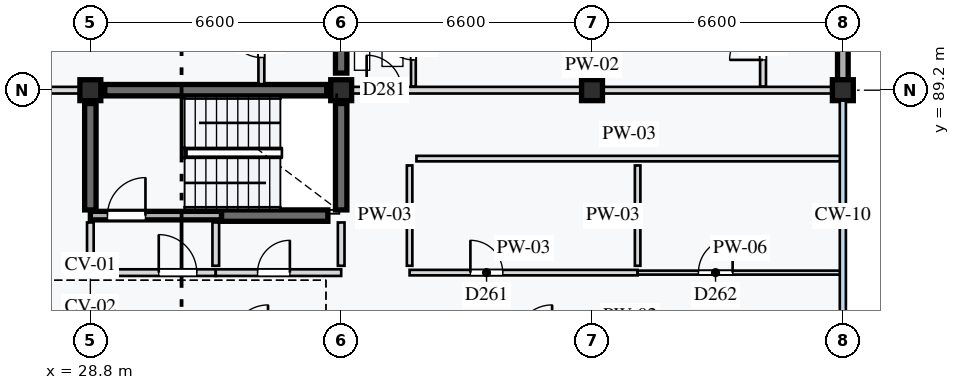
"""IFC4 building model, lengths in metres.
Left out: names, types, materials, properties, quantities, classifications, styles, units other than length and angle.
Written with IfcOpenShell. Run it as: python <this file> out.ifc"""

import sys

from ifc_helpers import new_model, si_unit, direction, frame, frame_2d, origin, origin_2d, place, context, subcontext, project, spatial, rectangle, extrude, element, fill, save


model = new_model("IFC4")
c1 = context("Model", 3, precision=1e-05, world=origin(), true_north=direction((0.0, 1.0)))
c2 = subcontext(c1, "Body", "Model", "MODEL_VIEW")
j1 = project(units=[si_unit("LENGTHUNIT", "METRE"), si_unit("PLANEANGLEUNIT", "RADIAN")], contexts=[c1])
p1 = place(None, origin())
s1 = spatial("IfcSite", under=j1, at=p1, CompositionType="ELEMENT")
p2 = place(p1, origin())
s2 = spatial("IfcBuilding", under=s1, at=p2, CompositionType="ELEMENT")
p3 = place(p2, frame((0.0, 0.0, 27.6)))
s3 = spatial("IfcBuildingStorey", under=s2, at=p3, CompositionType="ELEMENT", Elevation=27.6)
for number, where, z_axis, x_axis in (
    (1, (28.8, 89.2, 0.0), (0.0, 0.0, 1.0), (1.0, 0.0, 0.0)),
    (2, (35.4, 89.2, 0.0), (0.0, 0.0, 1.0), (1.0, 0.0, 0.0)),
    (3, (42.0, 89.2, 0.0), (0.0, 0.0, 1.0), (1.0, 0.0, 0.0)),
    (4, (48.6, 89.2, 0.0), (0.0, 0.0, 1.0), (1.0, 0.0, 0.0)),
):
    element("IfcColumn", number, at=place(p3, frame(where, z_axis=z_axis, x_axis=x_axis)), inside=s3, PredefinedType="COLUMN", context=c2, shape_type="SweptSolid", body=[
        extrude(rectangle(XDim=0.55, YDim=0.55, at=origin_2d()), origin(), (0.0, 0.0, 1.0), 3.2),
    ])
p4 = place(p3, frame((29.18, 89.2, 0.0), z_axis=(0.0, 0.0, 1.0), x_axis=(1.0, 0.0, 0.0)))
e5 = element("IfcWall", 5, at=p4, inside=s3, PredefinedType="SHEAR", context=c2, shape_type="SweptSolid", body=[
    extrude(rectangle(XDim=5.84, YDim=0.3, at=frame_2d((2.92, 0.0))), origin(), (0.0, 0.0, 1.0), 2.97),
])
for number, where, z_axis, x_axis in (
    (6, (32.25, 85.9, 0.0), (0.0, 0.0, 1.0), (1.0, 0.0, 0.0)),
    (7, (28.8, 86.05, 0.0), (0.0, 0.0, 1.0), (0.0, 1.0, 0.0)),
    (8, (35.4, 86.05, 0.0), (0.0, 0.0, 1.0), (0.0, 1.0, 0.0)),
):
    element("IfcWall", number, at=place(p3, frame(where, z_axis=z_axis, x_axis=x_axis)), inside=s3, PredefinedType="SHEAR", context=c2, shape_type="SweptSolid", body=[
        extrude(rectangle(XDim=2.8, YDim=0.3, at=frame_2d((1.4, 0.0))), origin(), (0.0, 0.0, 1.0), 2.97),
    ])
p5 = place(p3, frame((35.4, 89.65, 0.0), z_axis=(0.0, 0.0, 1.0), x_axis=(0.0, 1.0, 0.0)))
e9 = element("IfcWall", 9, at=p5, inside=s3, PredefinedType="SHEAR", context=c2, shape_type="SweptSolid", body=[
    extrude(rectangle(XDim=5.7, YDim=0.3, at=frame_2d((2.85, 0.0))), origin(), (0.0, 0.0, 1.0), 2.97),
])
p6 = place(p3, frame((48.6, 89.475, 0.0), z_axis=(0.0, 0.0, 1.0), x_axis=(0.0, 1.0, 0.0)))
e10 = element("IfcWall", 10, at=p6, inside=s3, PredefinedType="STANDARD", context=c2, shape_type="SweptSolid", body=[
    extrude(rectangle(XDim=3.985, YDim=0.28, at=frame_2d((1.992, 0.0))), origin(), (0.0, 0.0, 1.0), 2.65),
])
p7 = place(p3, frame((28.8, 85.9, 0.0), z_axis=(0.0, 0.0, 1.0), x_axis=(1.0, 0.0, 0.0)))
e11 = element("IfcWall", 11, at=p7, inside=s3, PredefinedType="STANDARD", context=c2, shape_type="SweptSolid", body=[
    extrude(rectangle(XDim=3.45, YDim=0.225, at=frame_2d((1.725, 0.0))), origin(), (0.0, 0.0, 1.0), 2.97),
])
p8 = place(p7, frame((0.45, 0.0, 0.0)))
e12 = element("IfcOpeningElement", 12, at=p8, cuts=e11, PredefinedType="OPENING", context=c2, shape_type="SweptSolid", body=[
    extrude(rectangle(XDim=1.0, YDim=2.1, at=frame_2d((0.5, 1.05))), frame((0.0, 0.123, 0.0), z_axis=(0.0, -1.0, 0.0), x_axis=(1.0, 0.0, 0.0)), (0.0, 0.0, 1.0), 0.245),
])
p9 = place(p3, frame((28.8, 84.4, 0.0), z_axis=(0.0, 0.0, 1.0), x_axis=(1.0, 0.0, 0.0)))
e13 = element("IfcWall", 13, at=p9, inside=s3, PredefinedType="PARTITIONING", context=c2, shape_type="SweptSolid", body=[
    extrude(rectangle(XDim=3.3, YDim=0.175, at=frame_2d((1.65, 0.0))), origin(), (0.0, 0.0, 1.0), 2.97),
])
p10 = place(p9, frame((1.8, 0.0, 0.0)))
e14 = element("IfcOpeningElement", 14, at=p10, cuts=e13, PredefinedType="OPENING", context=c2, shape_type="SweptSolid", body=[
    extrude(rectangle(XDim=1.0, YDim=2.16, at=frame_2d((0.5, 1.08))), frame((0.0, 0.097, 0.0), z_axis=(0.0, -1.0, 0.0), x_axis=(1.0, 0.0, 0.0)), (0.0, 0.0, 1.0), 0.195),
])
p11 = place(p3, frame((32.1, 84.4, 0.0), z_axis=(0.0, 0.0, 1.0), x_axis=(1.0, 0.0, 0.0)))
e15 = element("IfcWall", 15, at=p11, inside=s3, PredefinedType="PARTITIONING", context=c2, shape_type="SweptSolid", body=[
    extrude(rectangle(XDim=3.3, YDim=0.175, at=frame_2d((1.65, 0.0))), origin(), (0.0, 0.0, 1.0), 2.97),
])
p12 = place(p11, frame((1.1, 0.0, 0.0)))
e16 = element("IfcOpeningElement", 16, at=p12, cuts=e15, PredefinedType="OPENING", context=c2, shape_type="SweptSolid", body=[
    extrude(rectangle(XDim=0.85, YDim=2.0, at=frame_2d((0.425, 1.0))), frame((0.0, 0.097, 0.0), z_axis=(0.0, -1.0, 0.0), x_axis=(1.0, 0.0, 0.0)), (0.0, 0.0, 1.0), 0.195),
])
for number, where, z_axis, x_axis in (
    (17, (28.8, 84.58, 0.0), (0.0, 0.0, 1.0), (0.0, 1.0, 0.0)),
    (18, (32.1, 84.58, 0.0), (0.0, 0.0, 1.0), (0.0, 1.0, 0.0)),
    (19, (35.4, 84.58, 0.0), (0.0, 0.0, 1.0), (0.0, 1.0, 0.0)),
):
    element("IfcWall", number, at=place(p3, frame(where, z_axis=z_axis, x_axis=x_axis)), inside=s3, PredefinedType="PARTITIONING", context=c2, shape_type="SweptSolid", body=[
        extrude(rectangle(XDim=1.14, YDim=0.175, at=frame_2d((0.57, 0.0))), origin(), (0.0, 0.0, 1.0), 2.97),
    ])
p13 = place(p3, frame((37.2, 84.4, 0.0), z_axis=(0.0, 0.0, 1.0), x_axis=(1.0, 0.0, 0.0)))
e20 = element("IfcWall", 20, at=p13, inside=s3, PredefinedType="PARTITIONING", context=c2, shape_type="SweptSolid", body=[
    extrude(rectangle(XDim=6.0, YDim=0.145, at=frame_2d((3.0, 0.0))), origin(), (0.0, 0.0, 1.0), 2.97),
])
p14 = place(p13, frame((1.6, 0.0, 0.0)))
e21 = element("IfcOpeningElement", 21, at=p14, cuts=e20, PredefinedType="OPENING", context=c2, shape_type="SweptSolid", body=[
    extrude(rectangle(XDim=0.85, YDim=2.1, at=frame_2d((0.425, 1.05))), frame((0.0, 0.083, 0.0), z_axis=(0.0, -1.0, 0.0), x_axis=(1.0, 0.0, 0.0)), (0.0, 0.0, 1.0), 0.165),
])
p15 = place(p3, frame((43.2, 84.4, 0.0), z_axis=(0.0, 0.0, 1.0), x_axis=(1.0, 0.0, 0.0)))
e22 = element("IfcWall", 22, at=p15, inside=s3, PredefinedType="PARTITIONING", context=c2, shape_type="SweptSolid", body=[
    extrude(rectangle(XDim=5.4, YDim=0.105, at=frame_2d((2.7, 0.0))), origin(), (0.0, 0.0, 1.0), 2.97),
])
p16 = place(p15, frame((1.6, 0.0, 0.0)))
e23 = element("IfcOpeningElement", 23, at=p16, cuts=e22, PredefinedType="OPENING", context=c2, shape_type="SweptSolid", body=[
    extrude(rectangle(XDim=0.9, YDim=2.1, at=frame_2d((0.45, 1.05))), frame((0.0, 0.062, 0.0), z_axis=(0.0, -1.0, 0.0), x_axis=(1.0, 0.0, 0.0)), (0.0, 0.0, 1.0), 0.125),
])
p17 = place(p3, frame((43.2, 84.58, 0.0), z_axis=(0.0, 0.0, 1.0), x_axis=(0.0, 1.0, 0.0)))
e24 = element("IfcWall", 24, at=p17, inside=s3, PredefinedType="PARTITIONING", context=c2, shape_type="SweptSolid", body=[
    extrude(rectangle(XDim=2.64, YDim=0.145, at=frame_2d((1.32, 0.0))), origin(), (0.0, 0.0, 1.0), 2.97),
])
p18 = place(p3, frame((37.38, 87.4, 0.0), z_axis=(0.0, 0.0, 1.0), x_axis=(1.0, 0.0, 0.0)))
e25 = element("IfcWall", 25, at=p18, inside=s3, PredefinedType="PARTITIONING", context=c2, shape_type="SweptSolid", body=[
    extrude(rectangle(XDim=11.2, YDim=0.145, at=frame_2d((5.6, 0.0))), origin(), (0.0, 0.0, 1.0), 2.97),
])
p19 = place(p3, frame((37.2, 84.58, 0.0), z_axis=(0.0, 0.0, 1.0), x_axis=(0.0, 1.0, 0.0)))
e26 = element("IfcWall", 26, at=p19, inside=s3, PredefinedType="PARTITIONING", context=c2, shape_type="SweptSolid", body=[
    extrude(rectangle(XDim=2.64, YDim=0.145, at=frame_2d((1.32, 0.0))), origin(), (0.0, 0.0, 1.0), 2.97),
])
p20 = place(p3, frame((22.2, 89.2, 0.0), z_axis=(0.0, 0.0, 1.0), x_axis=(1.0, 0.0, 0.0)))
e27 = element("IfcWall", 27, at=p20, inside=s3, PredefinedType="PARTITIONING", context=c2, shape_type="SweptSolid", body=[
    extrude(rectangle(XDim=6.6, YDim=0.175, at=frame_2d((3.3, 0.0))), origin(), (0.0, 0.0, 1.0), 2.55),
])
p21 = place(p20, frame((3.85, 0.0, 0.0)))
e28 = element("IfcOpeningElement", 28, at=p21, cuts=e27, PredefinedType="OPENING", context=c2, shape_type="SweptSolid", body=[
    extrude(rectangle(XDim=0.95, YDim=2.16, at=frame_2d((0.475, 1.08))), frame((0.0, 0.097, 0.0), z_axis=(0.0, -1.0, 0.0), x_axis=(1.0, 0.0, 0.0)), (0.0, 0.0, 1.0), 0.195),
])
p22 = place(p3, frame((33.3, 89.36, 0.0), z_axis=(0.0, 0.0, 1.0), x_axis=(0.0, 1.0, 0.0)))
e29 = element("IfcWall", 29, at=p22, inside=s3, PredefinedType="PARTITIONING", context=c2, shape_type="SweptSolid", body=[
    extrude(rectangle(XDim=2.24, YDim=0.155, at=frame_2d((1.12, 0.0))), origin(), (0.0, 0.0, 1.0), 2.97),
])
p23 = place(p22, frame((0.7, 0.0, 0.0)))
e30 = element("IfcOpeningElement", 30, at=p23, cuts=e29, PredefinedType="OPENING", context=c2, shape_type="SweptSolid", body=[
    extrude(rectangle(XDim=0.87, YDim=2.08, at=frame_2d((0.435, 1.04))), frame((0.0, 0.087, 0.0), z_axis=(0.0, -1.0, 0.0), x_axis=(1.0, 0.0, 0.0)), (0.0, 0.0, 1.0), 0.175),
])
p24 = place(p3, frame((35.4, 89.2, 0.0), z_axis=(0.0, 0.0, 1.0), x_axis=(1.0, 0.0, 0.0)))
e31 = element("IfcWall", 31, at=p24, inside=s3, PredefinedType="PARTITIONING", context=c2, shape_type="SweptSolid", body=[
    extrude(rectangle(XDim=13.2, YDim=0.175, at=frame_2d((6.6, 0.0))), origin(), (0.0, 0.0, 1.0), 2.55),
])
p25 = place(p24, frame((0.67, 0.0, 0.0)))
e32 = element("IfcOpeningElement", 32, at=p25, cuts=e31, PredefinedType="OPENING", context=c2, shape_type="SweptSolid", body=[
    extrude(rectangle(XDim=0.92, YDim=2.14, at=frame_2d((0.46, 1.07))), frame((0.0, 0.097, 0.0), z_axis=(0.0, -1.0, 0.0), x_axis=(1.0, 0.0, 0.0)), (0.0, 0.0, 1.0), 0.195),
])
p26 = place(p3, frame((37.3, 89.298, 0.0), z_axis=(0.0, 0.0, 1.0), x_axis=(0.0, 1.0, 0.0)))
e33 = element("IfcWall", 33, at=p26, inside=s3, PredefinedType="PARTITIONING", context=c2, shape_type="SweptSolid", body=[
    extrude(rectangle(XDim=2.302, YDim=0.125, at=frame_2d((1.151, 0.0))), origin(), (0.0, 0.0, 1.0), 2.97),
])
p27 = place(p26, frame((0.7, 0.0, 0.0)))
e34 = element("IfcOpeningElement", 34, at=p27, cuts=e33, PredefinedType="OPENING", context=c2, shape_type="SweptSolid", body=[
    extrude(rectangle(XDim=0.82, YDim=2.05, at=frame_2d((0.41, 1.025))), frame((0.0, 0.073, 0.0), z_axis=(0.0, -1.0, 0.0), x_axis=(1.0, 0.0, 0.0)), (0.0, 0.0, 1.0), 0.145),
])
p28 = place(p3, frame((46.5, 89.298, 0.0), z_axis=(0.0, 0.0, 1.0), x_axis=(0.0, 1.0, 0.0)))
e35 = element("IfcWall", 35, at=p28, inside=s3, PredefinedType="PARTITIONING", context=c2, shape_type="SweptSolid", body=[
    extrude(rectangle(XDim=2.302, YDim=0.155, at=frame_2d((1.151, 0.0))), origin(), (0.0, 0.0, 1.0), 2.97),
])
p29 = place(p28, frame((0.7, 0.0, 0.0)))
e36 = element("IfcOpeningElement", 36, at=p29, cuts=e35, PredefinedType="OPENING", context=c2, shape_type="SweptSolid", body=[
    extrude(rectangle(XDim=0.88, YDim=2.1, at=frame_2d((0.44, 1.05))), frame((0.0, 0.087, 0.0), z_axis=(0.0, -1.0, 0.0), x_axis=(1.0, 0.0, 0.0)), (0.0, 0.0, 1.0), 0.175),
])
p30 = place(p8, origin())
e37 = element("IfcDoor", 37, at=p30, inside=s3, OperationType="SINGLE_SWING_RIGHT", PredefinedType="DOOR", context=c2, shape_type="SweptSolid", body=[
    extrude(rectangle(XDim=1.0, YDim=2.1, at=frame_2d((0.5, 1.05))), frame((0.0, 0.025, 0.0), z_axis=(0.0, -1.0, 0.0), x_axis=(1.0, 0.0, 0.0)), (0.0, 0.0, 1.0), 0.05),
])
fill(e12, e37)
p31 = place(p10, origin())
e38 = element("IfcDoor", 38, at=p31, inside=s3, OperationType="SINGLE_SWING_LEFT", PredefinedType="DOOR", context=c2, shape_type="SweptSolid", body=[
    extrude(rectangle(XDim=1.0, YDim=2.16, at=frame_2d((0.5, 1.08))), frame((0.0, 0.025, 0.0), z_axis=(0.0, -1.0, 0.0), x_axis=(1.0, 0.0, 0.0)), (0.0, 0.0, 1.0), 0.05),
])
fill(e14, e38)
p32 = place(p12, origin())
e39 = element("IfcDoor", 39, at=p32, inside=s3, OperationType="SINGLE_SWING_RIGHT", PredefinedType="DOOR", context=c2, shape_type="SweptSolid", body=[
    extrude(rectangle(XDim=0.85, YDim=2.0, at=frame_2d((0.425, 1.0))), frame((0.0, 0.025, 0.0), z_axis=(0.0, -1.0, 0.0), x_axis=(1.0, 0.0, 0.0)), (0.0, 0.0, 1.0), 0.05),
])
fill(e16, e39)
p33 = place(p14, origin())
e40 = element("IfcDoor", 40, at=p33, inside=s3, OperationType="SINGLE_SWING_LEFT", PredefinedType="DOOR", context=c2, shape_type="SweptSolid", body=[
    extrude(rectangle(XDim=0.85, YDim=2.1, at=frame_2d((0.425, 1.05))), frame((0.0, 0.025, 0.0), z_axis=(0.0, -1.0, 0.0), x_axis=(1.0, 0.0, 0.0)), (0.0, 0.0, 1.0), 0.05),
])
fill(e21, e40)
p34 = place(p16, origin())
e41 = element("IfcDoor", 41, at=p34, inside=s3, OperationType="SINGLE_SWING_RIGHT", PredefinedType="DOOR", context=c2, shape_type="SweptSolid", body=[
    extrude(rectangle(XDim=0.9, YDim=2.1, at=frame_2d((0.45, 1.05))), frame((0.0, 0.025, 0.0), z_axis=(0.0, -1.0, 0.0), x_axis=(1.0, 0.0, 0.0)), (0.0, 0.0, 1.0), 0.05),
])
fill(e23, e41)
p35 = place(p23, origin())
e42 = element("IfcDoor", 42, at=p35, inside=s3, OperationType="SINGLE_SWING_RIGHT", PredefinedType="DOOR", context=c2, shape_type="SweptSolid", body=[
    extrude(rectangle(XDim=0.87, YDim=2.08, at=frame_2d((0.435, 1.04))), frame((0.0, 0.025, 0.0), z_axis=(0.0, -1.0, 0.0), x_axis=(1.0, 0.0, 0.0)), (0.0, 0.0, 1.0), 0.05),
])
fill(e30, e42)
p36 = place(p25, origin())
e43 = element("IfcDoor", 43, at=p36, inside=s3, OperationType="SINGLE_SWING_LEFT", PredefinedType="DOOR", context=c2, shape_type="SweptSolid", body=[
    extrude(rectangle(XDim=0.92, YDim=2.14, at=frame_2d((0.46, 1.07))), frame((0.0, 0.025, 0.0), z_axis=(0.0, -1.0, 0.0), x_axis=(1.0, 0.0, 0.0)), (0.0, 0.0, 1.0), 0.05),
])
fill(e32, e43)
p37 = place(p27, origin())
e44 = element("IfcDoor", 44, at=p37, inside=s3, OperationType="SINGLE_SWING_RIGHT", PredefinedType="DOOR", context=c2, shape_type="SweptSolid", body=[
    extrude(rectangle(XDim=0.82, YDim=2.05, at=frame_2d((0.41, 1.025))), frame((0.0, 0.025, 0.0), z_axis=(0.0, -1.0, 0.0), x_axis=(1.0, 0.0, 0.0)), (0.0, 0.0, 1.0), 0.05),
])
fill(e34, e44)
p38 = place(p29, origin())
e45 = element("IfcDoor", 45, at=p38, inside=s3, OperationType="SINGLE_SWING_LEFT", PredefinedType="DOOR", context=c2, shape_type="SweptSolid", body=[
    extrude(rectangle(XDim=0.88, YDim=2.1, at=frame_2d((0.44, 1.05))), frame((0.0, 0.025, 0.0), z_axis=(0.0, -1.0, 0.0), x_axis=(1.0, 0.0, 0.0)), (0.0, 0.0, 1.0), 0.05),
])
fill(e36, e45)
save(model, sys.argv[1])
